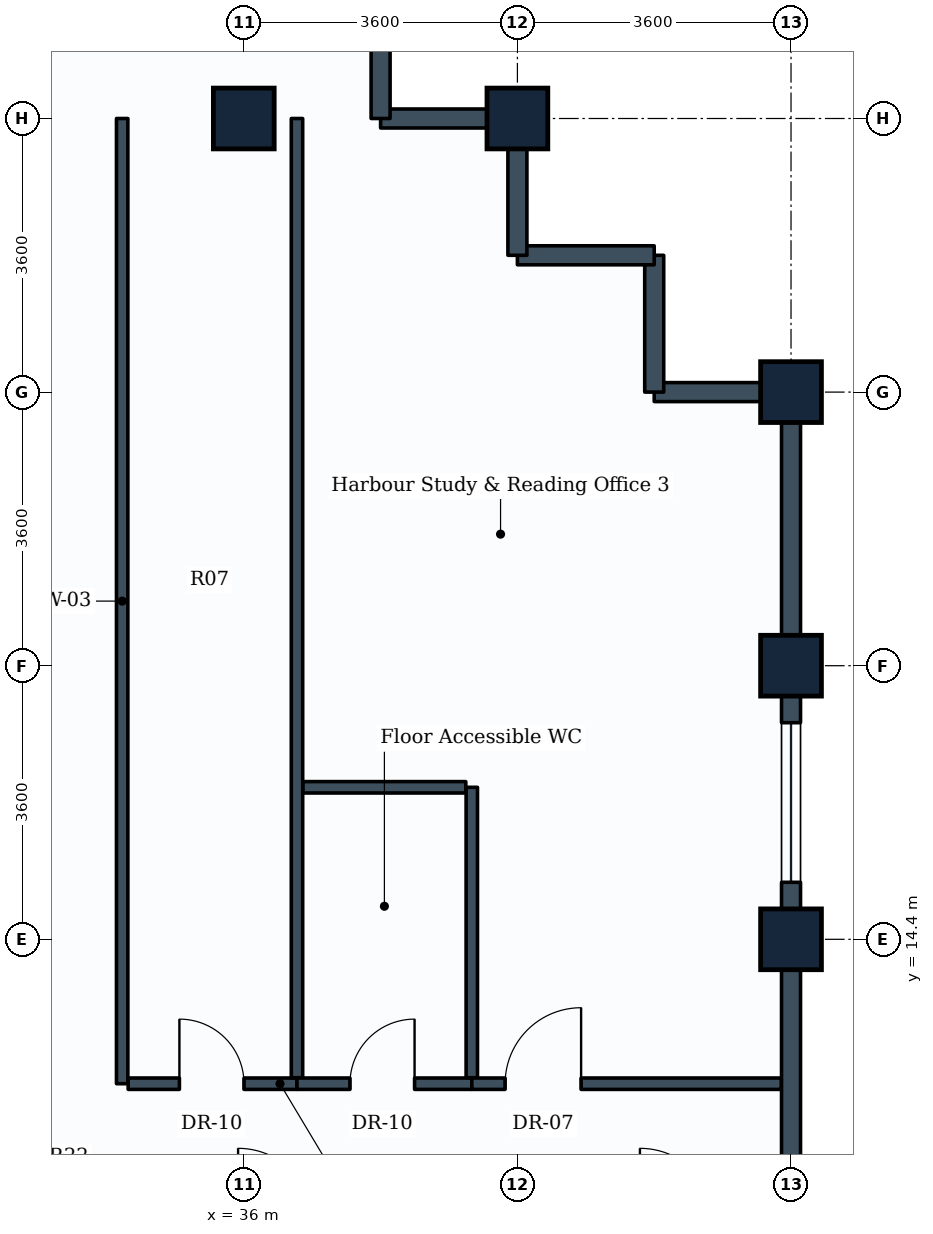
"""IFC4 building model, lengths in metres.
Left out: names, types, materials, properties, quantities, classifications, styles, units other than length and angle.
Written with IfcOpenShell. Run it as: python <this file> out.ifc"""

import sys

from ifc_helpers import new_model, si_unit, direction, frame, frame_2d, origin, origin_2d, place, context, subcontext, project, spatial, rectangle, extrude, element, fill, save


model = new_model("IFC4")
c1 = context("Model", 3, precision=1e-05, world=origin(), true_north=direction((0.0, 1.0)))
c2 = subcontext(c1, "Body", "Model", "MODEL_VIEW")
j1 = project(units=[si_unit("LENGTHUNIT", "METRE"), si_unit("PLANEANGLEUNIT", "RADIAN")], contexts=[c1])
p1 = place(None, origin())
s1 = spatial("IfcSite", under=j1, at=p1, CompositionType="ELEMENT")
p2 = place(p1, origin())
s2 = spatial("IfcBuilding", under=s1, at=p2, CompositionType="ELEMENT")
p3 = place(p2, frame((0.0, 0.0, 255.8)))
s3 = spatial("IfcBuildingStorey", under=s2, at=p3, CompositionType="ELEMENT", Elevation=255.8)
for number, where, z_axis, x_axis in (
    (1, (36.0, 25.2, 0.0), (0.0, 0.0, 1.0), (1.0, 0.0, 0.0)),
    (2, (39.6, 25.2, 0.0), (0.0, 0.0, 1.0), (1.0, 0.0, 0.0)),
    (3, (43.2, 14.4, 0.0), (0.0, 0.0, 1.0), (0.0, 1.0, 0.0)),
    (4, (43.2, 18.0, 0.0), (0.0, 0.0, 1.0), (0.0, 1.0, 0.0)),
    (5, (43.2, 21.6, 0.0), (0.0, 0.0, 1.0), (0.0, 1.0, 0.0)),
):
    element("IfcColumn", number, at=place(p3, frame(where, z_axis=z_axis, x_axis=x_axis)), inside=s3, PredefinedType="COLUMN", context=c2, shape_type="SweptSolid", body=[
        extrude(rectangle(XDim=0.8, YDim=0.8, at=origin_2d()), origin(), (0.0, 0.0, 1.0), 3.6),
    ])
p4 = place(p3, frame((43.2, 14.4, 0.0), z_axis=(0.0, 0.0, 1.0), x_axis=(0.0, -1.0, 0.0)))
e6 = element("IfcWall", 6, at=p4, inside=s3, PredefinedType="STANDARD", context=c2, shape_type="SweptSolid", body=[
    extrude(rectangle(XDim=3.6, YDim=0.25, at=frame_2d((1.8, 0.0))), origin(), (0.0, 0.0, 1.0), 2.83),
])
p5 = place(p3, frame((43.2, 18.0, 0.0), z_axis=(0.0, 0.0, 1.0), x_axis=(0.0, -1.0, 0.0)))
e7 = element("IfcWall", 7, at=p5, inside=s3, PredefinedType="STANDARD", context=c2, shape_type="SweptSolid", body=[
    extrude(rectangle(XDim=3.6, YDim=0.25, at=frame_2d((1.8, 0.0))), origin(), (0.0, 0.0, 1.0), 2.83),
])
p6 = place(p5, frame((0.75, 0.0, 0.85)))
e8 = element("IfcOpeningElement", 8, at=p6, cuts=e7, PredefinedType="OPENING", context=c2, shape_type="SweptSolid", body=[
    extrude(rectangle(XDim=2.1, YDim=1.35, at=frame_2d((1.05, 0.675))), frame((0.0, 0.135, 0.0), z_axis=(0.0, -1.0, 0.0), x_axis=(1.0, 0.0, 0.0)), (0.0, 0.0, 1.0), 0.27),
])
p7 = place(p3, frame((43.2, 21.6, 0.0), z_axis=(0.0, 0.0, 1.0), x_axis=(0.0, -1.0, 0.0)))
e9 = element("IfcWall", 9, at=p7, inside=s3, PredefinedType="STANDARD", context=c2, shape_type="SweptSolid", body=[
    extrude(rectangle(XDim=3.6, YDim=0.25, at=frame_2d((1.8, 0.0))), origin(), (0.0, 0.0, 1.0), 2.83),
])
p8 = place(p3, frame((41.4, 21.6, 0.0), z_axis=(0.0, 0.0, 1.0), x_axis=(1.0, 0.0, 0.0)))
e10 = element("IfcWall", 10, at=p8, inside=s3, PredefinedType="STANDARD", context=c2, shape_type="SweptSolid", body=[
    extrude(rectangle(XDim=1.8, YDim=0.25, at=frame_2d((0.9, 0.0))), origin(), (0.0, 0.0, 1.0), 2.83),
])
for number, where, z_axis, x_axis in (
    (11, (41.4, 23.4, 0.0), (0.0, 0.0, 1.0), (0.0, -1.0, 0.0)),
    (12, (39.6, 23.4, 0.0), (0.0, 0.0, 1.0), (1.0, 0.0, 0.0)),
):
    element("IfcWall", number, at=place(p3, frame(where, z_axis=z_axis, x_axis=x_axis)), inside=s3, PredefinedType="STANDARD", context=c2, shape_type="SweptSolid", body=[
        extrude(rectangle(XDim=1.8, YDim=0.25, at=frame_2d((0.9, 0.0))), origin(), (0.0, 0.0, 1.0), 3.335),
    ])
for number, where, z_axis, x_axis in (
    (13, (39.6, 25.2, 0.0), (0.0, 0.0, 1.0), (0.0, -1.0, 0.0)),
    (14, (37.8, 25.2, 0.0), (0.0, 0.0, 1.0), (1.0, 0.0, 0.0)),
):
    element("IfcWall", number, at=place(p3, frame(where, z_axis=z_axis, x_axis=x_axis)), inside=s3, PredefinedType="STANDARD", context=c2, shape_type="SweptSolid", body=[
        extrude(rectangle(XDim=1.8, YDim=0.25, at=frame_2d((0.9, 0.0))), origin(), (0.0, 0.0, 1.0), 2.83),
    ])
p9 = place(p3, frame((37.8, 27.3, 0.0), z_axis=(0.0, 0.0, 1.0), x_axis=(0.0, -1.0, 0.0)))
e15 = element("IfcWall", 15, at=p9, inside=s3, PredefinedType="STANDARD", context=c2, shape_type="SweptSolid", body=[
    extrude(rectangle(XDim=2.1, YDim=0.25, at=frame_2d((1.05, 0.0))), origin(), (0.0, 0.0, 1.0), 2.83),
])
p10 = place(p3, frame((34.4, 12.5, 0.0), z_axis=(0.0, 0.0, 1.0), x_axis=(0.0, 1.0, 0.0)))
e16 = element("IfcWall", 16, at=p10, inside=s3, PredefinedType="PARTITIONING", context=c2, shape_type="SweptSolid", body=[
    extrude(rectangle(XDim=12.7, YDim=0.15, at=frame_2d((6.35, 0.0))), origin(), (0.0, 0.0, 1.0), 2.83),
])
p11 = place(p3, frame((34.479, 12.5, 0.0), z_axis=(0.0, 0.0, 1.0), x_axis=(1.0, 0.0, 0.0)))
e17 = element("IfcWall", 17, at=p11, inside=s3, PredefinedType="PARTITIONING", context=c2, shape_type="SweptSolid", body=[
    extrude(rectangle(XDim=2.221, YDim=0.15, at=frame_2d((1.11, 0.0))), origin(), (0.0, 0.0, 1.0), 3.02),
])
p12 = place(p11, frame((0.674, 0.0, 0.0)))
e18 = element("IfcOpeningElement", 18, at=p12, cuts=e17, PredefinedType="OPENING", context=c2, shape_type="SweptSolid", body=[
    extrude(rectangle(XDim=0.85, YDim=2.1, at=frame_2d((0.425, 1.05))), frame((0.0, 0.085, 0.0), z_axis=(0.0, -1.0, 0.0), x_axis=(1.0, 0.0, 0.0)), (0.0, 0.0, 1.0), 0.17),
])
p13 = place(p3, frame((36.7, 12.579, 0.0), z_axis=(0.0, 0.0, 1.0), x_axis=(0.0, 1.0, 0.0)))
e19 = element("IfcWall", 19, at=p13, inside=s3, PredefinedType="PARTITIONING", context=c2, shape_type="SweptSolid", body=[
    extrude(rectangle(XDim=12.621, YDim=0.15, at=frame_2d((6.311, 0.0))), origin(), (0.0, 0.0, 1.0), 2.83),
])
p14 = place(p3, frame((36.7, 12.5, 0.0), z_axis=(0.0, 0.0, 1.0), x_axis=(1.0, 0.0, 0.0)))
e20 = element("IfcWall", 20, at=p14, inside=s3, PredefinedType="PARTITIONING", context=c2, shape_type="SweptSolid", body=[
    extrude(rectangle(XDim=2.3, YDim=0.15, at=frame_2d((1.15, 0.0))), origin(), (0.0, 0.0, 1.0), 3.335),
])
p15 = place(p14, frame((0.697, 0.0, 0.0)))
e21 = element("IfcOpeningElement", 21, at=p15, cuts=e20, PredefinedType="OPENING", context=c2, shape_type="SweptSolid", body=[
    extrude(rectangle(XDim=0.85, YDim=2.1, at=frame_2d((0.425, 1.05))), frame((0.0, 0.085, 0.0), z_axis=(0.0, -1.0, 0.0), x_axis=(1.0, 0.0, 0.0)), (0.0, 0.0, 1.0), 0.17),
])
p16 = place(p3, frame((39.0, 12.579, 0.0), z_axis=(0.0, 0.0, 1.0), x_axis=(0.0, 1.0, 0.0)))
e22 = element("IfcWall", 22, at=p16, inside=s3, PredefinedType="PARTITIONING", context=c2, shape_type="SweptSolid", body=[
    extrude(rectangle(XDim=3.821, YDim=0.15, at=frame_2d((1.91, 0.0))), origin(), (0.0, 0.0, 1.0), 3.03),
])
p17 = place(p3, frame((36.779, 16.4, 0.0), z_axis=(0.0, 0.0, 1.0), x_axis=(1.0, 0.0, 0.0)))
e23 = element("IfcWall", 23, at=p17, inside=s3, PredefinedType="PARTITIONING", context=c2, shape_type="SweptSolid", body=[
    extrude(rectangle(XDim=2.142, YDim=0.15, at=frame_2d((1.071, 0.0))), origin(), (0.0, 0.0, 1.0), 3.335),
])
p18 = place(p3, frame((39.0, 12.5, 0.0), z_axis=(0.0, 0.0, 1.0), x_axis=(1.0, 0.0, 0.0)))
e24 = element("IfcWall", 24, at=p18, inside=s3, PredefinedType="PARTITIONING", context=c2, shape_type="SweptSolid", body=[
    extrude(rectangle(XDim=4.071, YDim=0.15, at=frame_2d((2.036, 0.0))), origin(), (0.0, 0.0, 1.0), 2.83),
])
p19 = place(p18, frame((0.438, 0.0, 0.0)))
e25 = element("IfcOpeningElement", 25, at=p19, cuts=e24, PredefinedType="OPENING", context=c2, shape_type="SweptSolid", body=[
    extrude(rectangle(XDim=1.0, YDim=2.1, at=frame_2d((0.5, 1.05))), frame((0.0, 0.085, 0.0), z_axis=(0.0, -1.0, 0.0), x_axis=(1.0, 0.0, 0.0)), (0.0, 0.0, 1.0), 0.17),
])
p20 = place(p6, origin())
e26 = element("IfcWindow", 26, at=p20, inside=s3, PartitioningType="SINGLE_PANEL", PredefinedType="WINDOW", context=c2, shape_type="SweptSolid", body=[
    extrude(rectangle(XDim=2.1, YDim=1.35, at=frame_2d((1.05, 0.675))), frame((0.0, 0.03, 0.0), z_axis=(0.0, -1.0, 0.0), x_axis=(1.0, 0.0, 0.0)), (0.0, 0.0, 1.0), 0.06),
])
fill(e8, e26)
p21 = place(p12, origin())
e27 = element("IfcDoor", 27, at=p21, inside=s3, OperationType="SINGLE_SWING_LEFT", PredefinedType="DOOR", context=c2, shape_type="SweptSolid", body=[
    extrude(rectangle(XDim=0.85, YDim=2.1, at=frame_2d((0.425, 1.05))), frame((0.0, 0.025, 0.0), z_axis=(0.0, -1.0, 0.0), x_axis=(1.0, 0.0, 0.0)), (0.0, 0.0, 1.0), 0.05),
])
fill(e18, e27)
p22 = place(p15, origin())
e28 = element("IfcDoor", 28, at=p22, inside=s3, OperationType="SINGLE_SWING_RIGHT", PredefinedType="DOOR", context=c2, shape_type="SweptSolid", body=[
    extrude(rectangle(XDim=0.85, YDim=2.1, at=frame_2d((0.425, 1.05))), frame((0.0, 0.025, 0.0), z_axis=(0.0, -1.0, 0.0), x_axis=(1.0, 0.0, 0.0)), (0.0, 0.0, 1.0), 0.05),
])
fill(e21, e28)
p23 = place(p19, origin())
e29 = element("IfcDoor", 29, at=p23, inside=s3, OperationType="SINGLE_SWING_RIGHT", PredefinedType="DOOR", context=c2, shape_type="SweptSolid", body=[
    extrude(rectangle(XDim=1.0, YDim=2.1, at=frame_2d((0.5, 1.05))), frame((0.0, 0.025, 0.0), z_axis=(0.0, -1.0, 0.0), x_axis=(1.0, 0.0, 0.0)), (0.0, 0.0, 1.0), 0.05),
])
fill(e25, e29)
save(model, sys.argv[1])
